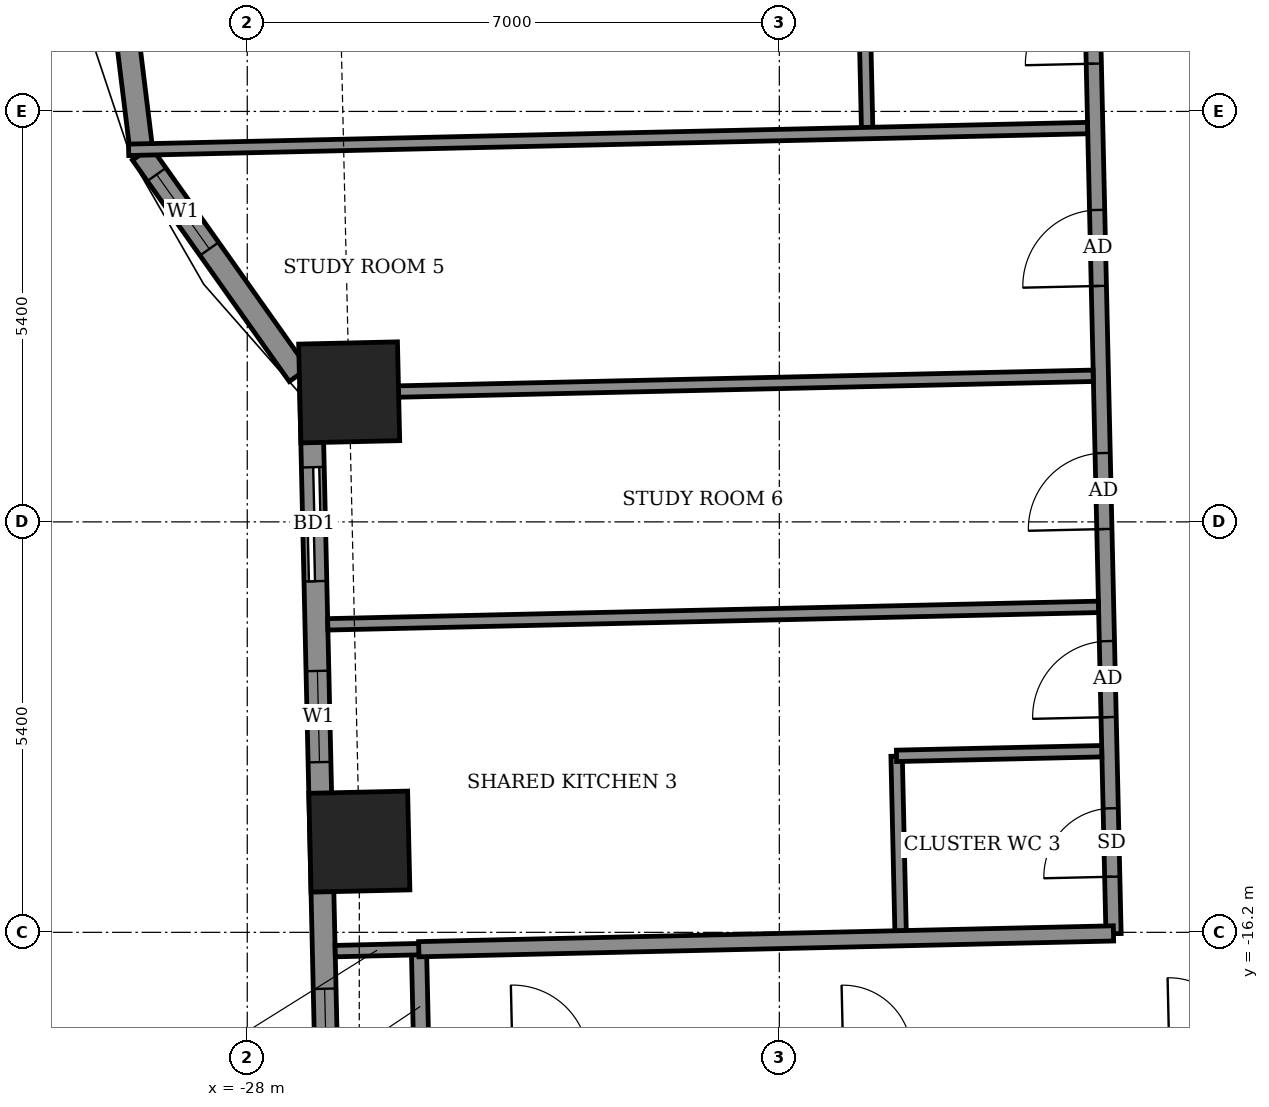
"""IFC4 building model, lengths in metres.
Left out: names, types, materials, properties, quantities, classifications, styles, units other than length and angle.
Written with IfcOpenShell. Run it as: python <this file> out.ifc"""

import sys

from ifc_helpers import new_model, si_unit, direction, frame, frame_2d, origin, origin_2d, place, context, subcontext, project, spatial, rectangle, extrude, element, fill, save


model = new_model("IFC4")
c1 = context("Model", 3, precision=1e-05, world=origin(), true_north=direction((0.0, 1.0)))
c2 = subcontext(c1, "Body", "Model", "MODEL_VIEW")
j1 = project(units=[si_unit("LENGTHUNIT", "METRE"), si_unit("PLANEANGLEUNIT", "RADIAN")], contexts=[c1])
p1 = place(None, origin())
s1 = spatial("IfcSite", under=j1, at=p1, CompositionType="ELEMENT")
p2 = place(p1, origin())
s2 = spatial("IfcBuilding", under=s1, at=p2, CompositionType="ELEMENT")
p3 = place(p2, frame((0.0, 0.0, 137.3)))
s3 = spatial("IfcBuildingStorey", under=s2, at=p3, CompositionType="ELEMENT", Elevation=137.3)
for number, where, z_axis, x_axis in (
    (1, (-26.659, -9.096, -0.55), (0.0, 0.0, 1.0), (0.023, -1.0, 0.0)),
    (2, (-26.525, -15.006, -0.55), (0.0, 0.0, 1.0), (0.023, -1.0, 0.0)),
):
    element("IfcColumn", number, at=place(p3, frame(where, z_axis=z_axis, x_axis=x_axis)), inside=s3, PredefinedType="COLUMN", context=c2, shape_type="SweptSolid", body=[
        extrude(rectangle(XDim=1.3, YDim=1.3, at=origin_2d()), origin(), (0.0, 0.0, 1.0), 3.6),
    ])
p4 = place(p3, frame((-30.069, -0.422, 0.0), z_axis=(0.0, 0.0, 1.0), x_axis=(0.122206978992, -0.992504636909, 0.0)))
e3 = element("IfcWall", 3, at=p4, inside=s3, PredefinedType="SOLIDWALL", context=c2, shape_type="SweptSolid", body=[
    extrude(rectangle(XDim=5.574, YDim=0.3, at=frame_2d((2.787, 0.0))), origin(), (0.0, 0.0, 1.0), 3.05),
])
p5 = place(p4, frame((2.187, 0.0, 0.9)))
e4 = element("IfcOpeningElement", 4, at=p5, cuts=e3, PredefinedType="OPENING", context=c2, shape_type="SweptSolid", body=[
    extrude(rectangle(XDim=1.2, YDim=1.5, at=frame_2d((0.6, 0.75))), frame((0.0, 0.16, 0.0), z_axis=(0.0, -1.0, 0.0), x_axis=(1.0, 0.0, 0.0)), (0.0, 0.0, 1.0), 0.32),
])
p6 = place(p3, frame((-29.388, -5.954, 0.0), z_axis=(0.0, 0.0, 1.0), x_axis=(0.578095163598, -0.815969351033, 0.0)))
e5 = element("IfcWall", 5, at=p6, inside=s3, PredefinedType="SOLIDWALL", context=c2, shape_type="SweptSolid", body=[
    extrude(rectangle(XDim=3.569, YDim=0.3, at=frame_2d((1.784, 0.0))), origin(), (0.0, 0.0, 1.0), 3.05),
])
p7 = place(p6, frame((0.338, 0.0, 0.9)))
e6 = element("IfcOpeningElement", 6, at=p7, cuts=e5, PredefinedType="OPENING", context=c2, shape_type="SweptSolid", body=[
    extrude(rectangle(XDim=1.2, YDim=1.5, at=frame_2d((0.6, 0.75))), frame((0.0, 0.16, 0.0), z_axis=(0.0, -1.0, 0.0), x_axis=(1.0, 0.0, 0.0)), (0.0, 0.0, 1.0), 0.32),
])
p8 = place(p3, frame((-27.161, -9.052, 0.0), z_axis=(0.0, 0.0, 1.0), x_axis=(0.022665616813, -0.999743101909, 0.0)))
e7 = element("IfcWall", 7, at=p8, inside=s3, PredefinedType="SOLIDWALL", context=c2, shape_type="SweptSolid", body=[
    extrude(rectangle(XDim=11.73, YDim=0.3, at=frame_2d((5.865, 0.0))), origin(), (0.0, 0.0, 1.0), 3.05),
])
p9 = place(p8, frame((1.029, 0.0, 0.0)))
e8 = element("IfcOpeningElement", 8, at=p9, cuts=e7, PredefinedType="OPENING", context=c2, shape_type="SweptSolid", body=[
    extrude(rectangle(XDim=1.5, YDim=2.4, at=frame_2d((0.75, 1.2))), frame((0.0, 0.16, 0.0), z_axis=(0.0, -1.0, 0.0), x_axis=(1.0, 0.0, 0.0)), (0.0, 0.0, 1.0), 0.32),
])
p10 = place(p8, frame((3.71, 0.0, 0.9)))
e9 = element("IfcOpeningElement", 9, at=p10, cuts=e7, PredefinedType="OPENING", context=c2, shape_type="SweptSolid", body=[
    extrude(rectangle(XDim=1.2, YDim=1.5, at=frame_2d((0.6, 0.75))), frame((0.0, 0.16, 0.0), z_axis=(0.0, -1.0, 0.0), x_axis=(1.0, 0.0, 0.0)), (0.0, 0.0, 1.0), 0.32),
])
p11 = place(p8, frame((7.892, 0.0, 0.9)))
e10 = element("IfcOpeningElement", 10, at=p11, cuts=e7, PredefinedType="OPENING", context=c2, shape_type="SweptSolid", body=[
    extrude(rectangle(XDim=2.4, YDim=1.5, at=frame_2d((1.2, 0.75))), frame((0.0, 0.16, 0.0), z_axis=(0.0, -1.0, 0.0), x_axis=(1.0, 0.0, 0.0)), (0.0, 0.0, 1.0), 0.32),
])
p12 = place(p3, frame((-29.739, -17.293, 0.0), z_axis=(0.0, 0.0, 1.0), x_axis=(-0.022662255828, 0.999743178102, 0.0)))
e11 = element("IfcWall", 11, at=p12, inside=s3, PredefinedType="USERDEFINED", context=c2, shape_type="SweptSolid", body=[
    extrude(rectangle(XDim=6.0, YDim=0.55, at=frame_2d((3.0, 0.0))), origin(), (0.0, 0.0, 1.0), 0.8),
])
p13 = place(p3, frame((-25.707, -17.925, 0.0), z_axis=(0.0, 0.0, 1.0), x_axis=(-0.022617910375, 0.999744182344, 0.0)))
e12 = element("IfcWall", 12, at=p13, inside=s3, PredefinedType="PARTITIONING", context=c2, shape_type="SweptSolid", body=[
    extrude(rectangle(XDim=1.5, YDim=0.2, at=frame_2d((0.75, 0.0))), origin(), (0.0, 0.0, 1.0), 3.05),
])
p14 = place(p3, frame((-19.405, -16.182, 0.0), z_axis=(0.0, 0.0, 1.0), x_axis=(-0.022605686808, 0.999744458811, 0.0)))
e13 = element("IfcWall", 13, at=p14, inside=s3, PredefinedType="PARTITIONING", context=c2, shape_type="SweptSolid", body=[
    extrude(rectangle(XDim=2.3, YDim=0.15, at=frame_2d((1.15, 0.0))), origin(), (0.0, 0.0, 1.0), 3.05),
])
p15 = place(p3, frame((-16.603, -16.218, 0.0), z_axis=(0.0, 0.0, 1.0), x_axis=(-0.022698146637, 0.999742363881, 0.0)))
e14 = element("IfcWall", 14, at=p15, inside=s3, PredefinedType="PARTITIONING", context=c2, shape_type="SweptSolid", body=[
    extrude(rectangle(XDim=28.374, YDim=0.2, at=frame_2d((14.187, 0.0))), origin(), (0.0, 0.0, 1.0), 3.05),
])
p16 = place(p15, frame((24.537, 0.0, 0.0)))
e15 = element("IfcOpeningElement", 15, at=p16, cuts=e14, PredefinedType="OPENING", context=c2, shape_type="SweptSolid", body=[
    extrude(rectangle(XDim=1.0, YDim=2.1, at=frame_2d((0.5, 1.05))), frame((0.0, 0.11, 0.0), z_axis=(0.0, -1.0, 0.0), x_axis=(1.0, 0.0, 0.0)), (0.0, 0.0, 1.0), 0.22),
])
p17 = place(p15, frame((26.724, 0.0, 0.0)))
e16 = element("IfcOpeningElement", 16, at=p17, cuts=e14, PredefinedType="OPENING", context=c2, shape_type="SweptSolid", body=[
    extrude(rectangle(XDim=0.9, YDim=2.1, at=frame_2d((0.45, 1.05))), frame((0.0, 0.11, 0.0), z_axis=(0.0, -1.0, 0.0), x_axis=(1.0, 0.0, 0.0)), (0.0, 0.0, 1.0), 0.22),
])
p18 = place(p15, frame((22.099, 0.0, 0.0)))
e17 = element("IfcOpeningElement", 17, at=p18, cuts=e14, PredefinedType="OPENING", context=c2, shape_type="SweptSolid", body=[
    extrude(rectangle(XDim=1.0, YDim=2.1, at=frame_2d((0.5, 1.05))), frame((0.0, 0.11, 0.0), z_axis=(0.0, -1.0, 0.0), x_axis=(1.0, 0.0, 0.0)), (0.0, 0.0, 1.0), 0.22),
])
p19 = place(p15, frame((16.324, 0.0, 0.0)))
e18 = element("IfcOpeningElement", 18, at=p19, cuts=e14, PredefinedType="OPENING", context=c2, shape_type="SweptSolid", body=[
    extrude(rectangle(XDim=1.0, YDim=2.1, at=frame_2d((0.5, 1.05))), frame((0.0, 0.11, 0.0), z_axis=(0.0, -1.0, 0.0), x_axis=(1.0, 0.0, 0.0)), (0.0, 0.0, 1.0), 0.22),
])
p20 = place(p15, frame((19.449, 0.0, 0.0)))
e19 = element("IfcOpeningElement", 19, at=p20, cuts=e14, PredefinedType="OPENING", context=c2, shape_type="SweptSolid", body=[
    extrude(rectangle(XDim=0.9, YDim=2.1, at=frame_2d((0.45, 1.05))), frame((0.0, 0.11, 0.0), z_axis=(0.0, -1.0, 0.0), x_axis=(1.0, 0.0, 0.0)), (0.0, 0.0, 1.0), 0.22),
])
p21 = place(p15, frame((13.574, 0.0, 0.0)))
e20 = element("IfcOpeningElement", 20, at=p21, cuts=e14, PredefinedType="OPENING", context=c2, shape_type="SweptSolid", body=[
    extrude(rectangle(XDim=1.0, YDim=2.1, at=frame_2d((0.5, 1.05))), frame((0.0, 0.11, 0.0), z_axis=(0.0, -1.0, 0.0), x_axis=(1.0, 0.0, 0.0)), (0.0, 0.0, 1.0), 0.22),
])
p22 = place(p15, frame((11.449, 0.0, 0.0)))
e21 = element("IfcOpeningElement", 21, at=p22, cuts=e14, PredefinedType="OPENING", context=c2, shape_type="SweptSolid", body=[
    extrude(rectangle(XDim=0.9, YDim=2.1, at=frame_2d((0.45, 1.05))), frame((0.0, 0.11, 0.0), z_axis=(0.0, -1.0, 0.0), x_axis=(1.0, 0.0, 0.0)), (0.0, 0.0, 1.0), 0.22),
])
p23 = place(p15, frame((8.524, 0.0, 0.0)))
e22 = element("IfcOpeningElement", 22, at=p23, cuts=e14, PredefinedType="OPENING", context=c2, shape_type="SweptSolid", body=[
    extrude(rectangle(XDim=1.0, YDim=2.1, at=frame_2d((0.5, 1.05))), frame((0.0, 0.11, 0.0), z_axis=(0.0, -1.0, 0.0), x_axis=(1.0, 0.0, 0.0)), (0.0, 0.0, 1.0), 0.22),
])
p24 = place(p15, frame((5.325, 0.0, 0.0)))
e23 = element("IfcOpeningElement", 23, at=p24, cuts=e14, PredefinedType="OPENING", context=c2, shape_type="SweptSolid", body=[
    extrude(rectangle(XDim=1.0, YDim=2.1, at=frame_2d((0.5, 1.05))), frame((0.0, 0.11, 0.0), z_axis=(0.0, -1.0, 0.0), x_axis=(1.0, 0.0, 0.0)), (0.0, 0.0, 1.0), 0.22),
])
p25 = place(p15, frame((2.85, 0.0, 0.0)))
e24 = element("IfcOpeningElement", 24, at=p25, cuts=e14, PredefinedType="OPENING", context=c2, shape_type="SweptSolid", body=[
    extrude(rectangle(XDim=1.0, YDim=2.1, at=frame_2d((0.5, 1.05))), frame((0.0, 0.11, 0.0), z_axis=(0.0, -1.0, 0.0), x_axis=(1.0, 0.0, 0.0)), (0.0, 0.0, 1.0), 0.22),
])
p26 = place(p15, frame((0.75, 0.0, 0.0)))
e25 = element("IfcOpeningElement", 25, at=p26, cuts=e14, PredefinedType="OPENING", context=c2, shape_type="SweptSolid", body=[
    extrude(rectangle(XDim=0.9, YDim=2.1, at=frame_2d((0.45, 1.05))), frame((0.0, 0.11, 0.0), z_axis=(0.0, -1.0, 0.0), x_axis=(1.0, 0.0, 0.0)), (0.0, 0.0, 1.0), 0.22),
])
p27 = place(p3, frame((-26.843, -16.447, 0.0), z_axis=(0.0, 0.0, 1.0), x_axis=(0.999720170098, 0.023655475055, 0.0)))
e26 = element("IfcWall", 26, at=p27, inside=s3, PredefinedType="PARTITIONING", context=c2, shape_type="SweptSolid", body=[
    extrude(rectangle(XDim=1.104, YDim=0.15, at=frame_2d((0.552, 0.0))), origin(), (0.0, 0.0, 1.0), 2.55),
])
p28 = place(p3, frame((-25.743, -16.422, 0.0), z_axis=(0.0, 0.0, 1.0), x_axis=(0.999741076645, 0.022754772455, 0.0)))
e27 = element("IfcWall", 27, at=p28, inside=s3, PredefinedType="PARTITIONING", context=c2, shape_type="SweptSolid", body=[
    extrude(rectangle(XDim=9.141, YDim=0.2, at=frame_2d((4.571, 0.0))), origin(), (0.0, 0.0, 1.0), 3.05),
])
p29 = place(p3, frame((-19.458, -13.878, 0.0), z_axis=(0.0, 0.0, 1.0), x_axis=(0.999744396973, 0.02260842146, 0.0)))
e28 = element("IfcWall", 28, at=p29, inside=s3, PredefinedType="PARTITIONING", context=c2, shape_type="SweptSolid", body=[
    extrude(rectangle(XDim=2.7, YDim=0.15, at=frame_2d((1.35, 0.0))), origin(), (0.0, 0.0, 1.0), 3.05),
])
p30 = place(p3, frame((-26.941, -12.148, 0.0), z_axis=(0.0, 0.0, 1.0), x_axis=(0.999742841246, 0.022677111331, 0.0)))
e29 = element("IfcWall", 29, at=p30, inside=s3, PredefinedType="PARTITIONING", context=c2, shape_type="SweptSolid", body=[
    extrude(rectangle(XDim=10.142, YDim=0.15, at=frame_2d((5.071, 0.0))), origin(), (0.0, 0.0, 1.0), 2.55),
])
p31 = place(p3, frame((-27.01, -9.108, 0.0), z_axis=(0.0, 0.0, 1.0), x_axis=(0.999742841246, 0.022677111331, 0.0)))
e30 = element("IfcWall", 30, at=p31, inside=s3, PredefinedType="PARTITIONING", context=c2, shape_type="SweptSolid", body=[
    extrude(rectangle(XDim=10.142, YDim=0.15, at=frame_2d((5.071, 0.0))), origin(), (0.0, 0.0, 1.0), 3.05),
])
p32 = place(p3, frame((-19.845, -5.615, 0.0), z_axis=(0.0, 0.0, 1.0), x_axis=(-0.022629142889, 0.99974392816, 0.0)))
e31 = element("IfcWall", 31, at=p32, inside=s3, PredefinedType="PARTITIONING", context=c2, shape_type="SweptSolid", body=[
    extrude(rectangle(XDim=2.525, YDim=0.15, at=frame_2d((1.262, 0.0))), origin(), (0.0, 0.0, 1.0), 3.05),
])
p33 = place(p3, frame((-29.561, -5.905, 0.0), z_axis=(0.0, 0.0, 1.0), x_axis=(0.999742903154, 0.022674381858, 0.0)))
e32 = element("IfcWall", 32, at=p33, inside=s3, PredefinedType="PARTITIONING", context=c2, shape_type="SweptSolid", body=[
    extrude(rectangle(XDim=12.619, YDim=0.15, at=frame_2d((6.31, 0.0))), origin(), (0.0, 0.0, 1.0), 2.1),
])
p34 = place(p7, origin())
e33 = element("IfcWindow", 33, at=p34, inside=s3, PartitioningType="SINGLE_PANEL", PredefinedType="WINDOW", context=c2, shape_type="SweptSolid", body=[
    extrude(rectangle(XDim=1.2, YDim=1.5, at=frame_2d((0.6, 0.75))), frame((0.0, 0.03, 0.0), z_axis=(0.0, -1.0, 0.0), x_axis=(1.0, 0.0, 0.0)), (0.0, 0.0, 1.0), 0.06),
])
fill(e6, e33)
p35 = place(p9, origin())
e34 = element("IfcDoor", 34, at=p35, inside=s3, OperationType="SLIDING_TO_LEFT", PredefinedType="DOOR", context=c2, shape_type="SweptSolid", body=[
    extrude(rectangle(XDim=1.5, YDim=2.4, at=frame_2d((0.75, 1.2))), frame((0.0, 0.025, 0.0), z_axis=(0.0, -1.0, 0.0), x_axis=(1.0, 0.0, 0.0)), (0.0, 0.0, 1.0), 0.05),
])
fill(e8, e34)
p36 = place(p10, origin())
e35 = element("IfcWindow", 35, at=p36, inside=s3, PartitioningType="SINGLE_PANEL", PredefinedType="WINDOW", context=c2, shape_type="SweptSolid", body=[
    extrude(rectangle(XDim=1.2, YDim=1.5, at=frame_2d((0.6, 0.75))), frame((0.0, 0.03, 0.0), z_axis=(0.0, -1.0, 0.0), x_axis=(1.0, 0.0, 0.0)), (0.0, 0.0, 1.0), 0.06),
])
fill(e9, e35)
p37 = place(p11, origin())
e36 = element("IfcWindow", 36, at=p37, inside=s3, PartitioningType="DOUBLE_PANEL_VERTICAL", PredefinedType="WINDOW", context=c2, shape_type="SweptSolid", body=[
    extrude(rectangle(XDim=2.4, YDim=1.5, at=frame_2d((1.2, 0.75))), frame((0.0, 0.03, 0.0), z_axis=(0.0, -1.0, 0.0), x_axis=(1.0, 0.0, 0.0)), (0.0, 0.0, 1.0), 0.06),
])
fill(e10, e36)
p38 = place(p22, origin())
e37 = element("IfcDoor", 37, at=p38, inside=s3, OperationType="SINGLE_SWING_LEFT", PredefinedType="DOOR", context=c2, shape_type="SweptSolid", body=[
    extrude(rectangle(XDim=0.9, YDim=2.1, at=frame_2d((0.45, 1.05))), frame((0.0, 0.025, 0.0), z_axis=(0.0, -1.0, 0.0), x_axis=(1.0, 0.0, 0.0)), (0.0, 0.0, 1.0), 0.05),
])
fill(e21, e37)
p39 = place(p23, origin())
e38 = element("IfcDoor", 38, at=p39, inside=s3, OperationType="SINGLE_SWING_RIGHT", PredefinedType="DOOR", context=c2, shape_type="SweptSolid", body=[
    extrude(rectangle(XDim=1.0, YDim=2.1, at=frame_2d((0.5, 1.05))), frame((0.0, 0.025, 0.0), z_axis=(0.0, -1.0, 0.0), x_axis=(1.0, 0.0, 0.0)), (0.0, 0.0, 1.0), 0.05),
])
fill(e22, e38)
p40 = place(p24, origin())
e39 = element("IfcDoor", 39, at=p40, inside=s3, OperationType="SINGLE_SWING_LEFT", PredefinedType="DOOR", context=c2, shape_type="SweptSolid", body=[
    extrude(rectangle(XDim=1.0, YDim=2.1, at=frame_2d((0.5, 1.05))), frame((0.0, 0.025, 0.0), z_axis=(0.0, -1.0, 0.0), x_axis=(1.0, 0.0, 0.0)), (0.0, 0.0, 1.0), 0.05),
])
fill(e23, e39)
p41 = place(p25, origin())
e40 = element("IfcDoor", 40, at=p41, inside=s3, OperationType="SINGLE_SWING_RIGHT", PredefinedType="DOOR", context=c2, shape_type="SweptSolid", body=[
    extrude(rectangle(XDim=1.0, YDim=2.1, at=frame_2d((0.5, 1.05))), frame((0.0, 0.025, 0.0), z_axis=(0.0, -1.0, 0.0), x_axis=(1.0, 0.0, 0.0)), (0.0, 0.0, 1.0), 0.05),
])
fill(e24, e40)
p42 = place(p26, origin())
e41 = element("IfcDoor", 41, at=p42, inside=s3, OperationType="SINGLE_SWING_RIGHT", PredefinedType="DOOR", context=c2, shape_type="SweptSolid", body=[
    extrude(rectangle(XDim=0.9, YDim=2.1, at=frame_2d((0.45, 1.05))), frame((0.0, 0.025, 0.0), z_axis=(0.0, -1.0, 0.0), x_axis=(1.0, 0.0, 0.0)), (0.0, 0.0, 1.0), 0.05),
])
fill(e25, e41)
save(model, sys.argv[1])
